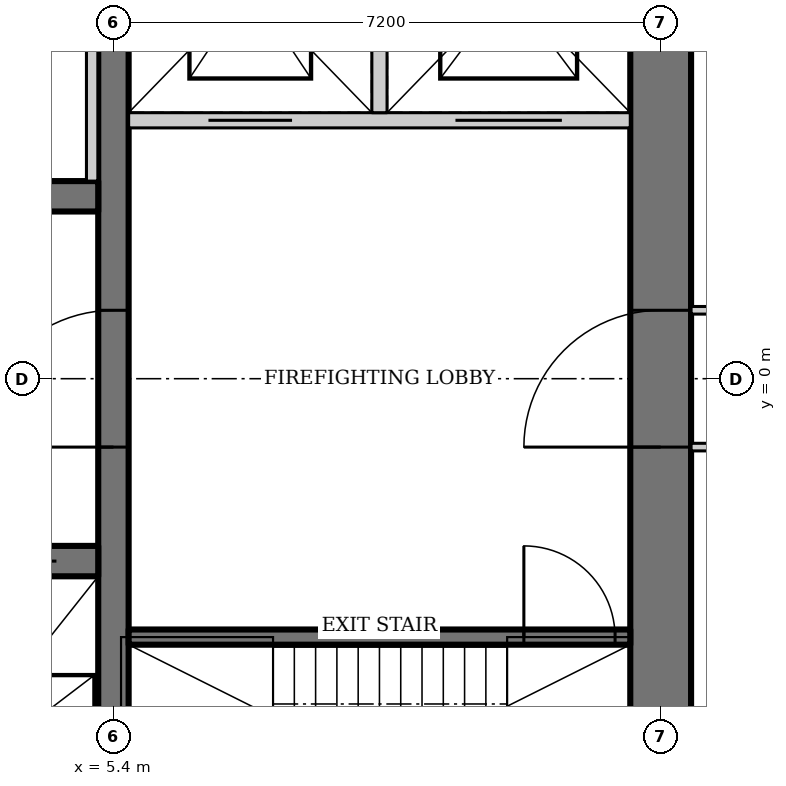
"""IFC4 building model, lengths in metres.
Left out: names, types, materials, properties, quantities, classifications, styles, units other than length and angle.
Written with IfcOpenShell. Run it as: python <this file> out.ifc"""

import sys

from ifc_helpers import new_model, si_unit, direction, frame, frame_2d, origin, place, context, subcontext, project, spatial, rectangle, extrude, element, fill, save


model = new_model("IFC4")
c1 = context("Model", 3, precision=1e-05, world=origin(), true_north=direction((0.0, 1.0)))
c2 = subcontext(c1, "Body", "Model", "MODEL_VIEW")
j1 = project(units=[si_unit("LENGTHUNIT", "METRE"), si_unit("PLANEANGLEUNIT", "RADIAN")], contexts=[c1])
p1 = place(None, origin())
s1 = spatial("IfcSite", under=j1, at=p1, CompositionType="ELEMENT")
p2 = place(p1, origin())
s2 = spatial("IfcBuilding", under=s1, at=p2, CompositionType="ELEMENT")
p3 = place(p2, frame((0.0, 0.0, 241.0)))
s3 = spatial("IfcBuildingStorey", under=s2, at=p3, CompositionType="ELEMENT", Elevation=241.0)
p4 = place(p3, frame((12.6, -11.0, 0.0), z_axis=(0.0, 0.0, 1.0), x_axis=(0.0, 1.0, 0.0)))
e1 = element("IfcWall", 1, at=p4, inside=s3, PredefinedType="SHEAR", context=c2, shape_type="SweptSolid", body=[
    extrude(rectangle(XDim=22.0, YDim=0.8, at=frame_2d((11.0, 0.0))), origin(), (0.0, 0.0, 1.0), 4.2),
])
p5 = place(p4, frame((10.1, 0.0, 0.0)))
e2 = element("IfcOpeningElement", 2, at=p5, cuts=e1, PredefinedType="OPENING", context=c2, shape_type="SweptSolid", body=[
    extrude(rectangle(XDim=1.8, YDim=2.1, at=frame_2d((0.9, 1.05))), frame((0.0, 0.41, 0.0), z_axis=(0.0, -1.0, 0.0), x_axis=(1.0, 0.0, 0.0)), (0.0, 0.0, 1.0), 0.82),
])
p6 = place(p3, frame((5.4, -6.8, 0.0), z_axis=(0.0, 0.0, 1.0), x_axis=(0.0, 1.0, 0.0)))
e3 = element("IfcWall", 3, at=p6, inside=s3, PredefinedType="SHEAR", context=c2, shape_type="SweptSolid", body=[
    extrude(rectangle(XDim=14.6, YDim=0.4, at=frame_2d((7.3, 0.0))), origin(), (0.0, 0.0, 1.0), 4.2),
])
p7 = place(p6, frame((5.9, 0.0, 0.0)))
e4 = element("IfcOpeningElement", 4, at=p7, cuts=e3, PredefinedType="OPENING", context=c2, shape_type="SweptSolid", body=[
    extrude(rectangle(XDim=1.8, YDim=2.1, at=frame_2d((0.9, 1.05))), frame((0.0, 0.21, 0.0), z_axis=(0.0, -1.0, 0.0), x_axis=(1.0, 0.0, 0.0)), (0.0, 0.0, 1.0), 0.42),
])
p8 = place(p3, frame((-5.2, -2.4, 0.0), z_axis=(0.0, 0.0, 1.0), x_axis=(1.0, 0.0, 0.0)))
e5 = element("IfcWall", 5, at=p8, inside=s3, PredefinedType="SHEAR", context=c2, shape_type="SweptSolid", body=[
    extrude(rectangle(XDim=10.4, YDim=0.4, at=frame_2d((5.2, 0.0))), origin(), (0.0, 0.0, 1.0), 4.2),
])
p9 = place(p8, frame((1.683, 0.0, 0.0)))
e6 = element("IfcOpeningElement", 6, at=p9, cuts=e5, PredefinedType="OPENING", context=c2, shape_type="SweptSolid", body=[
    extrude(rectangle(XDim=1.1, YDim=2.2, at=frame_2d((0.55, 1.1))), frame((0.0, 0.21, 0.0), z_axis=(0.0, -1.0, 0.0), x_axis=(1.0, 0.0, 0.0)), (0.0, 0.0, 1.0), 0.42),
])
p10 = place(p8, frame((5.217, 0.0, 0.0)))
e7 = element("IfcOpeningElement", 7, at=p10, cuts=e5, PredefinedType="OPENING", context=c2, shape_type="SweptSolid", body=[
    extrude(rectangle(XDim=1.1, YDim=2.2, at=frame_2d((0.55, 1.1))), frame((0.0, 0.21, 0.0), z_axis=(0.0, -1.0, 0.0), x_axis=(1.0, 0.0, 0.0)), (0.0, 0.0, 1.0), 0.42),
])
p11 = place(p8, frame((8.75, 0.0, 0.0)))
e8 = element("IfcOpeningElement", 8, at=p11, cuts=e5, PredefinedType="OPENING", context=c2, shape_type="SweptSolid", body=[
    extrude(rectangle(XDim=1.1, YDim=2.2, at=frame_2d((0.55, 1.1))), frame((0.0, 0.21, 0.0), z_axis=(0.0, -1.0, 0.0), x_axis=(1.0, 0.0, 0.0)), (0.0, 0.0, 1.0), 0.42),
])
p12 = place(p3, frame((5.2, 2.4, 0.0), z_axis=(0.0, 0.0, 1.0), x_axis=(-1.0, 0.0, 0.0)))
e9 = element("IfcWall", 9, at=p12, inside=s3, PredefinedType="SHEAR", context=c2, shape_type="SweptSolid", body=[
    extrude(rectangle(XDim=10.4, YDim=0.4, at=frame_2d((5.2, 0.0))), origin(), (0.0, 0.0, 1.0), 4.2),
])
p13 = place(p3, frame((5.6, -3.4, 0.0), z_axis=(0.0, 0.0, 1.0), x_axis=(1.0, 0.0, 0.0)))
e10 = element("IfcWall", 10, at=p13, inside=s3, PredefinedType="SHEAR", context=c2, shape_type="SweptSolid", body=[
    extrude(rectangle(XDim=6.6, YDim=0.2, at=frame_2d((3.3, 0.0))), origin(), (0.0, 0.0, 1.0), 4.2),
])
p14 = place(p13, frame((5.2, 0.0, 0.0)))
e11 = element("IfcOpeningElement", 11, at=p14, cuts=e10, PredefinedType="OPENING", context=c2, shape_type="SweptSolid", body=[
    extrude(rectangle(XDim=1.2, YDim=2.1, at=frame_2d((0.6, 1.05))), frame((0.0, 0.11, 0.0), z_axis=(0.0, -1.0, 0.0), x_axis=(1.0, 0.0, 0.0)), (0.0, 0.0, 1.0), 0.22),
])
p15 = place(p3, frame((12.2, 3.4, 0.0), z_axis=(0.0, 0.0, 1.0), x_axis=(-1.0, 0.0, 0.0)))
e12 = element("IfcWall", 12, at=p15, inside=s3, PredefinedType="SOLIDWALL", context=c2, shape_type="SweptSolid", body=[
    extrude(rectangle(XDim=6.6, YDim=0.2, at=frame_2d((3.3, 0.0))), origin(), (0.0, 0.0, 1.0), 4.2),
])
p16 = place(p15, frame((4.45, 0.0, 0.0)))
e13 = element("IfcOpeningElement", 13, at=p16, cuts=e12, PredefinedType="OPENING", context=c2, shape_type="SweptSolid", body=[
    extrude(rectangle(XDim=1.1, YDim=2.2, at=frame_2d((0.55, 1.1))), frame((0.0, 0.11, 0.0), z_axis=(0.0, -1.0, 0.0), x_axis=(1.0, 0.0, 0.0)), (0.0, 0.0, 1.0), 0.22),
])
p17 = place(p15, frame((0.9, 0.0, 0.0)))
e14 = element("IfcOpeningElement", 14, at=p17, cuts=e12, PredefinedType="OPENING", context=c2, shape_type="SweptSolid", body=[
    extrude(rectangle(XDim=1.4, YDim=2.2, at=frame_2d((0.7, 1.1))), frame((0.0, 0.11, 0.0), z_axis=(0.0, -1.0, 0.0), x_axis=(1.0, 0.0, 0.0)), (0.0, 0.0, 1.0), 0.22),
])
p18 = place(p3, frame((8.9, 3.5, 0.0), z_axis=(0.0, 0.0, 1.0), x_axis=(0.0, 1.0, 0.0)))
e15 = element("IfcWall", 15, at=p18, inside=s3, PredefinedType="SOLIDWALL", context=c2, shape_type="SweptSolid", body=[
    extrude(rectangle(XDim=3.3, YDim=0.2, at=frame_2d((1.65, 0.0))), origin(), (0.0, 0.0, 1.0), 4.2),
])
p19 = place(p3, frame((5.12, 2.6, 0.0), z_axis=(0.0, 0.0, 1.0), x_axis=(0.0, 1.0, 0.0)))
e16 = element("IfcWall", 16, at=p19, inside=s3, PredefinedType="SOLIDWALL", context=c2, shape_type="SweptSolid", body=[
    extrude(rectangle(XDim=4.4, YDim=0.15, at=frame_2d((2.2, 0.0))), origin(), (0.0, 0.0, 1.0), 4.05),
])
p20 = place(p3, frame((13.0, -0.9, 0.0), z_axis=(0.0, 0.0, 1.0), x_axis=(1.0, 0.0, 0.0)))
e17 = element("IfcWall", 17, at=p20, inside=s3, PredefinedType="PARTITIONING", context=c2, shape_type="SweptSolid", body=[
    extrude(rectangle(XDim=2.165, YDim=0.1, at=frame_2d((1.083, 0.0))), origin(), (0.0, 0.0, 1.0), 4.05),
])
p21 = place(p20, frame((1.15, 0.0, 0.0)))
e18 = element("IfcOpeningElement", 18, at=p21, cuts=e17, PredefinedType="OPENING", context=c2, shape_type="SweptSolid", body=[
    extrude(rectangle(XDim=0.9, YDim=2.1, at=frame_2d((0.45, 1.05))), frame((0.0, 0.06, 0.0), z_axis=(0.0, -1.0, 0.0), x_axis=(1.0, 0.0, 0.0)), (0.0, 0.0, 1.0), 0.12),
])
p22 = place(p3, frame((15.165, 0.9, 0.0), z_axis=(0.0, 0.0, 1.0), x_axis=(-1.0, 0.0, 0.0)))
e19 = element("IfcWall", 19, at=p22, inside=s3, PredefinedType="PARTITIONING", context=c2, shape_type="SweptSolid", body=[
    extrude(rectangle(XDim=2.165, YDim=0.1, at=frame_2d((1.083, 0.0))), origin(), (0.0, 0.0, 1.0), 4.05),
])
p23 = place(p22, frame((0.1, 0.0, 0.0)))
e20 = element("IfcOpeningElement", 20, at=p23, cuts=e19, PredefinedType="OPENING", context=c2, shape_type="SweptSolid", body=[
    extrude(rectangle(XDim=0.9, YDim=2.1, at=frame_2d((0.45, 1.05))), frame((0.0, 0.06, 0.0), z_axis=(0.0, -1.0, 0.0), x_axis=(1.0, 0.0, 0.0)), (0.0, 0.0, 1.0), 0.12),
])
p24 = place(p7, origin())
e21 = element("IfcDoor", 21, at=p24, inside=s3, OperationType="DOUBLE_DOOR_DOUBLE_SWING", PredefinedType="DOOR", context=c2, shape_type="SweptSolid", body=[
    extrude(rectangle(XDim=1.8, YDim=2.1, at=frame_2d((0.9, 1.05))), frame((0.0, 0.025, 0.0), z_axis=(0.0, -1.0, 0.0), x_axis=(1.0, 0.0, 0.0)), (0.0, 0.0, 1.0), 0.05),
])
fill(e4, e21)
p25 = place(p14, origin())
e22 = element("IfcDoor", 22, at=p25, inside=s3, OperationType="SINGLE_SWING_RIGHT", PredefinedType="DOOR", context=c2, shape_type="SweptSolid", body=[
    extrude(rectangle(XDim=1.2, YDim=2.1, at=frame_2d((0.6, 1.05))), frame((0.0, 0.025, 0.0), z_axis=(0.0, -1.0, 0.0), x_axis=(1.0, 0.0, 0.0)), (0.0, 0.0, 1.0), 0.05),
])
fill(e11, e22)
p26 = place(p5, origin())
e23 = element("IfcDoor", 23, at=p26, inside=s3, OperationType="DOUBLE_DOOR_DOUBLE_SWING", PredefinedType="DOOR", context=c2, shape_type="SweptSolid", body=[
    extrude(rectangle(XDim=1.8, YDim=2.1, at=frame_2d((0.9, 1.05))), frame((0.0, 0.025, 0.0), z_axis=(0.0, -1.0, 0.0), x_axis=(1.0, 0.0, 0.0)), (0.0, 0.0, 1.0), 0.05),
])
fill(e2, e23)
p27 = place(p11, origin())
e24 = element("IfcDoor", 24, at=p27, inside=s3, OperationType="DOUBLE_DOOR_SLIDING", PredefinedType="DOOR", context=c2, shape_type="SweptSolid", body=[
    extrude(rectangle(XDim=1.1, YDim=2.2, at=frame_2d((0.55, 1.1))), frame((0.0, 0.025, 0.0), z_axis=(0.0, -1.0, 0.0), x_axis=(1.0, 0.0, 0.0)), (0.0, 0.0, 1.0), 0.05),
])
fill(e8, e24)
p28 = place(p16, origin())
e25 = element("IfcDoor", 25, at=p28, inside=s3, OperationType="DOUBLE_DOOR_SLIDING", PredefinedType="DOOR", context=c2, shape_type="SweptSolid", body=[
    extrude(rectangle(XDim=1.1, YDim=2.2, at=frame_2d((0.55, 1.1))), frame((0.0, 0.025, 0.0), z_axis=(0.0, -1.0, 0.0), x_axis=(1.0, 0.0, 0.0)), (0.0, 0.0, 1.0), 0.05),
])
fill(e13, e25)
p29 = place(p17, origin())
e26 = element("IfcDoor", 26, at=p29, inside=s3, OperationType="DOUBLE_DOOR_SLIDING", PredefinedType="DOOR", context=c2, shape_type="SweptSolid", body=[
    extrude(rectangle(XDim=1.4, YDim=2.2, at=frame_2d((0.7, 1.1))), frame((0.0, 0.025, 0.0), z_axis=(0.0, -1.0, 0.0), x_axis=(1.0, 0.0, 0.0)), (0.0, 0.0, 1.0), 0.05),
])
fill(e14, e26)
save(model, sys.argv[1])
